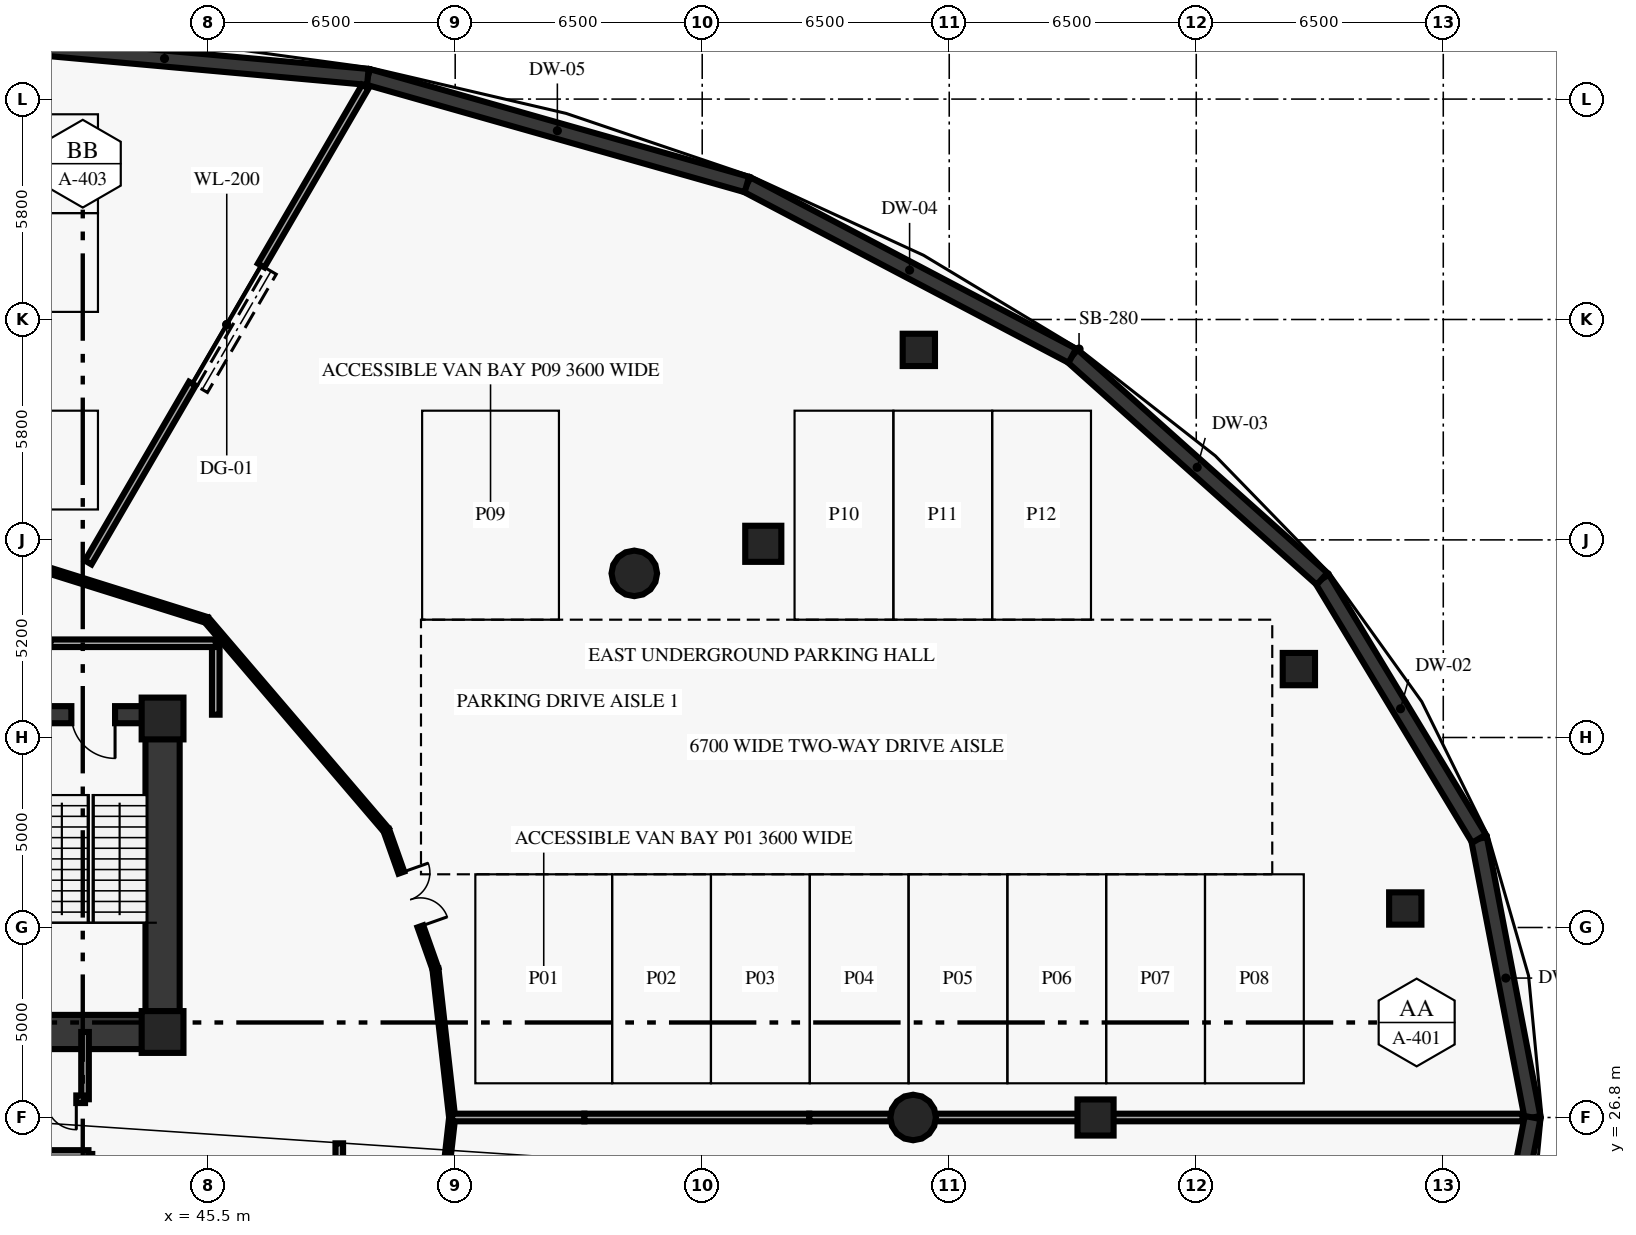
"""IFC4 building model, lengths in metres.
Left out: names, types, materials, properties, quantities, classifications, styles, units other than length and angle.
Written with IfcOpenShell. Run it as: python <this file> out.ifc"""

import sys

from ifc_helpers import new_model, si_unit, direction, frame, frame_2d, origin, origin_2d, place, context, subcontext, project, spatial, rectangle, circle, extrude, element, fill, save


model = new_model("IFC4")
c1 = context("Model", 3, precision=1e-05, world=origin(), true_north=direction((0.0, 1.0)))
c2 = subcontext(c1, "Body", "Model", "MODEL_VIEW")
j1 = project(units=[si_unit("LENGTHUNIT", "METRE"), si_unit("PLANEANGLEUNIT", "RADIAN")], contexts=[c1])
p1 = place(None, origin())
s1 = spatial("IfcSite", under=j1, at=p1, CompositionType="ELEMENT")
p2 = place(p1, origin())
s2 = spatial("IfcBuilding", under=s1, at=p2, CompositionType="ELEMENT")
p3 = place(p2, frame((0.0, 0.0, -9.0)))
s3 = spatial("IfcBuildingStorey", under=s2, at=p3, CompositionType="ELEMENT", Elevation=-9.0)
for number, where, z_axis, x_axis in (
    (1, (44.3, 29.05, 0.0), (0.0, 0.0, 1.0), (1.0, 0.0, 0.0)),
    (2, (44.3, 37.3, 0.0), (0.0, 0.0, 1.0), (1.0, 0.0, 0.0)),
):
    element("IfcColumn", number, at=place(p3, frame(where, z_axis=z_axis, x_axis=x_axis)), inside=s3, PredefinedType="PILASTER", context=c2, shape_type="SweptSolid", body=[
        extrude(rectangle(XDim=1.1, YDim=1.1, at=origin_2d()), origin(), (0.0, 0.0, 1.0), 4.2),
    ])
for number, where, z_axis, x_axis in (
    (3, (64.05, 26.8, 0.0), (0.0, 0.0, 1.0), (1.0, 0.0, 0.0)),
    (4, (56.713, 41.119, 0.0), (0.0, 0.0, 1.0), (1.0, 0.0, 0.0)),
):
    element("IfcColumn", number, at=place(p3, frame(where, z_axis=z_axis, x_axis=x_axis)), inside=s3, PredefinedType="COLUMN", context=c2, shape_type="SweptSolid", body=[
        extrude(circle(Radius=0.6, at=origin_2d()), origin(), (0.0, 0.0, 1.0), 4.2),
    ])
for number, where, z_axis, x_axis in (
    (5, (68.85, 26.8, 0.0), (0.0, 0.0, 1.0), (1.0, 0.0, 0.0)),
    (6, (60.107, 41.897, 0.0), (0.0, 0.0, 1.0), (1.0, 0.0, 0.0)),
):
    element("IfcColumn", number, at=place(p3, frame(where, z_axis=z_axis, x_axis=x_axis)), inside=s3, PredefinedType="COLUMN", context=c2, shape_type="SweptSolid", body=[
        extrude(rectangle(XDim=0.95, YDim=0.95, at=origin_2d()), origin(), (0.0, 0.0, 1.0), 4.2),
    ])
for number, where, z_axis, x_axis in (
    (7, (77.0, 32.3, 0.0), (0.0, 0.0, 1.0), (1.0, 0.0, 0.0)),
    (8, (74.2, 38.6, 0.0), (0.0, 0.0, 1.0), (1.0, 0.0, 0.0)),
    (9, (64.2, 47.0, 0.0), (0.0, 0.0, 1.0), (1.0, 0.0, 0.0)),
):
    element("IfcColumn", number, at=place(p3, frame(where, z_axis=z_axis, x_axis=x_axis)), inside=s3, PredefinedType="COLUMN", context=c2, shape_type="SweptSolid", body=[
        extrude(rectangle(XDim=0.85, YDim=0.85, at=origin_2d()), origin(), (0.0, 0.0, 1.0), 4.2),
    ])
p4 = place(p3, frame((44.3, 29.05, 0.0), z_axis=(0.0, 0.0, 1.0), x_axis=(0.0, 1.0, 0.0)))
e10 = element("IfcWall", 10, at=p4, inside=s3, PredefinedType="SHEAR", context=c2, shape_type="SweptSolid", body=[
    extrude(rectangle(XDim=8.35, YDim=0.9, at=frame_2d((4.175, 0.0))), origin(), (0.0, 0.0, 1.0), 4.2),
])
p5 = place(p3, frame((33.7, 29.05, 0.0), z_axis=(0.0, 0.0, 1.0), x_axis=(1.0, 0.0, 0.0)))
e11 = element("IfcWall", 11, at=p5, inside=s3, PredefinedType="SHEAR", context=c2, shape_type="SweptSolid", body=[
    extrude(rectangle(XDim=10.6, YDim=0.9, at=frame_2d((5.3, 0.0))), origin(), (0.0, 0.0, 1.0), 4.2),
])
p6 = place(p3, frame((80.35, 26.8, 0.0), z_axis=(0.0, 0.0, 1.0), x_axis=(-0.188595316219, 0.982054889861, 0.0)))
e12 = element("IfcWall", 12, at=p6, inside=s3, PredefinedType="SHEAR", context=c2, shape_type="SweptSolid", body=[
    extrude(rectangle(XDim=7.472, YDim=0.42, at=frame_2d((3.736, 0.0))), origin(), (0.0, 0.0, 1.0), 4.2),
])
p7 = place(p3, frame((78.941, 34.138, 0.0), z_axis=(0.0, 0.0, 1.0), x_axis=(-0.517122636798, 0.85591131463, 0.0)))
e13 = element("IfcWall", 13, at=p7, inside=s3, PredefinedType="SHEAR", context=c2, shape_type="SweptSolid", body=[
    extrude(rectangle(XDim=7.988, YDim=0.42, at=frame_2d((3.994, 0.0))), origin(), (0.0, 0.0, 1.0), 4.2),
])
p8 = place(p3, frame((74.81, 40.975, 0.0), z_axis=(0.0, 0.0, 1.0), x_axis=(-0.745720826992, 0.666258544554, 0.0)))
e14 = element("IfcWall", 14, at=p8, inside=s3, PredefinedType="SHEAR", context=c2, shape_type="SweptSolid", body=[
    extrude(rectangle(XDim=8.812, YDim=0.42, at=frame_2d((4.406, 0.0))), origin(), (0.0, 0.0, 1.0), 4.2),
])
p9 = place(p3, frame((68.239, 46.846, 0.0), z_axis=(0.0, 0.0, 1.0), x_axis=(-0.884971300821, 0.465645569852, 0.0)))
e15 = element("IfcWall", 15, at=p9, inside=s3, PredefinedType="SHEAR", context=c2, shape_type="SweptSolid", body=[
    extrude(rectangle(XDim=9.677, YDim=0.42, at=frame_2d((4.838, 0.0))), origin(), (0.0, 0.0, 1.0), 4.2),
])
p10 = place(p3, frame((59.675, 51.352, 0.0), z_axis=(0.0, 0.0, 1.0), x_axis=(-0.961967006375, 0.273165661541, 0.0)))
e16 = element("IfcWall", 16, at=p10, inside=s3, PredefinedType="SHEAR", context=c2, shape_type="SweptSolid", body=[
    extrude(rectangle(XDim=10.367, YDim=0.42, at=frame_2d((5.184, 0.0))), origin(), (0.0, 0.0, 1.0), 4.2),
])
p11 = place(p3, frame((49.702, 54.184, 0.0), z_axis=(0.0, 0.0, 1.0), x_axis=(-0.995952400538, 0.089882233296, 0.0)))
e17 = element("IfcWall", 17, at=p11, inside=s3, PredefinedType="SHEAR", context=c2, shape_type="SweptSolid", body=[
    extrude(rectangle(XDim=10.745, YDim=0.42, at=frame_2d((5.373, 0.0))), origin(), (0.0, 0.0, 1.0), 4.2),
])
p12 = place(p3, frame((78.941, 19.462, 0.0), z_axis=(0.0, 0.0, 1.0), x_axis=(0.188589264795, 0.982056051966, 0.0)))
e18 = element("IfcWall", 18, at=p12, inside=s3, PredefinedType="SHEAR", context=c2, shape_type="SweptSolid", body=[
    extrude(rectangle(XDim=7.472, YDim=0.42, at=frame_2d((3.736, 0.0))), origin(), (0.0, 0.0, 1.0), 4.2),
])
p13 = place(p3, frame((44.3, 37.4, 0.0), z_axis=(0.0, 0.0, 1.0), x_axis=(-1.0, 0.0, 0.0)))
e19 = element("IfcWall", 19, at=p13, inside=s3, PredefinedType="SHEAR", context=c2, shape_type="SweptSolid", body=[
    extrude(rectangle(XDim=3.65, YDim=0.45, at=frame_2d((1.825, 0.0))), origin(), (0.0, 0.0, 1.0), 4.2),
])
p14 = place(p13, frame((1.25, 0.0, 0.0)))
e20 = element("IfcOpeningElement", 20, at=p14, cuts=e19, PredefinedType="OPENING", context=c2, shape_type="SweptSolid", body=[
    extrude(rectangle(XDim=1.15, YDim=2.15, at=frame_2d((0.575, 1.075))), frame((0.0, 0.235, 0.0), z_axis=(0.0, -1.0, 0.0), x_axis=(1.0, 0.0, 0.0)), (0.0, 0.0, 1.0), 0.47),
])
p15 = place(p3, frame((45.7, 37.4, 0.0), z_axis=(0.0, 0.0, 1.0), x_axis=(0.0, 1.0, 0.0)))
e21 = element("IfcWall", 21, at=p15, inside=s3, PredefinedType="SOLIDWALL", context=c2, shape_type="SweptSolid", body=[
    extrude(rectangle(XDim=1.88, YDim=0.2, at=frame_2d((0.94, 0.0))), origin(), (0.0, 0.0, 1.0), 4.2),
])
p16 = place(p3, frame((45.7, 39.28, 0.0), z_axis=(0.0, 0.0, 1.0), x_axis=(-1.0, 0.0, 0.0)))
e22 = element("IfcWall", 22, at=p16, inside=s3, PredefinedType="SOLIDWALL", context=c2, shape_type="SweptSolid", body=[
    extrude(rectangle(XDim=6.6, YDim=0.2, at=frame_2d((3.3, 0.0))), origin(), (0.0, 0.0, 1.0), 4.2),
])
p17 = place(p16, frame((4.35, 0.0, 0.0)))
e23 = element("IfcOpeningElement", 23, at=p17, cuts=e22, PredefinedType="OPENING", context=c2, shape_type="SweptSolid", body=[
    extrude(rectangle(XDim=1.6, YDim=2.2, at=frame_2d((0.8, 1.1))), frame((0.0, 0.11, 0.0), z_axis=(0.0, -1.0, 0.0), x_axis=(1.0, 0.0, 0.0)), (0.0, 0.0, 1.0), 0.22),
])
p18 = place(p3, frame((42.26, 27.28, 0.0), z_axis=(0.0, 0.0, 1.0), x_axis=(0.0, 1.0, 0.0)))
e24 = element("IfcWall", 24, at=p18, inside=s3, PredefinedType="SOLIDWALL", context=c2, shape_type="SweptSolid", body=[
    extrude(rectangle(XDim=1.77, YDim=0.2, at=frame_2d((0.885, 0.0))), origin(), (0.0, 0.0, 1.0), 4.2),
])
p19 = place(p3, frame((41.0, 27.28, 0.0), z_axis=(0.0, 0.0, 1.0), x_axis=(1.0, 0.0, 0.0)))
e25 = element("IfcWall", 25, at=p19, inside=s3, PredefinedType="SOLIDWALL", context=c2, shape_type="SweptSolid", body=[
    extrude(rectangle(XDim=1.26, YDim=0.2, at=frame_2d((0.63, 0.0))), origin(), (0.0, 0.0, 1.0), 4.2),
])
p20 = place(p19, frame((0.23, 0.0, 0.0)))
e26 = element("IfcOpeningElement", 26, at=p20, cuts=e25, PredefinedType="OPENING", context=c2, shape_type="SweptSolid", body=[
    extrude(rectangle(XDim=0.8, YDim=2.05, at=frame_2d((0.4, 1.025))), frame((0.0, 0.11, 0.0), z_axis=(0.0, -1.0, 0.0), x_axis=(1.0, 0.0, 0.0)), (0.0, 0.0, 1.0), 0.22),
])
p21 = place(p3, frame((48.95, 19.05, 0.0), z_axis=(0.0, 0.0, 1.0), x_axis=(0.0, 1.0, 0.0)))
e27 = element("IfcWall", 27, at=p21, inside=s3, PredefinedType="SOLIDWALL", context=c2, shape_type="SweptSolid", body=[
    extrude(rectangle(XDim=7.07, YDim=0.2, at=frame_2d((3.535, 0.0))), origin(), (0.0, 0.0, 1.0), 4.2),
])
p22 = place(p21, frame((2.785, 0.0, 0.0)))
e28 = element("IfcOpeningElement", 28, at=p22, cuts=e27, PredefinedType="OPENING", context=c2, shape_type="SweptSolid", body=[
    extrude(rectangle(XDim=1.5, YDim=2.2, at=frame_2d((0.75, 1.1))), frame((0.0, 0.11, 0.0), z_axis=(0.0, -1.0, 0.0), x_axis=(1.0, 0.0, 0.0)), (0.0, 0.0, 1.0), 0.22),
])
p23 = place(p3, frame((42.35, 21.35, 0.0), z_axis=(0.0, 0.0, 1.0), x_axis=(0.0, 1.0, 0.0)))
e29 = element("IfcWall", 29, at=p23, inside=s3, PredefinedType="SOLIDWALL", context=c2, shape_type="SweptSolid", body=[
    extrude(rectangle(XDim=4.49, YDim=0.2, at=frame_2d((2.245, 0.0))), origin(), (0.0, 0.0, 1.0), 4.2),
])
p24 = place(p3, frame((42.35, 25.84, 0.0), z_axis=(0.0, 0.0, 1.0), x_axis=(-1.0, 0.0, 0.0)))
e30 = element("IfcWall", 30, at=p24, inside=s3, PredefinedType="SOLIDWALL", context=c2, shape_type="SweptSolid", body=[
    extrude(rectangle(XDim=8.65, YDim=0.2, at=frame_2d((4.325, 0.0))), origin(), (0.0, 0.0, 1.0), 4.2),
])
p25 = place(p24, frame((3.575, 0.0, 0.0)))
e31 = element("IfcOpeningElement", 31, at=p25, cuts=e30, PredefinedType="OPENING", context=c2, shape_type="SweptSolid", body=[
    extrude(rectangle(XDim=1.5, YDim=2.2, at=frame_2d((0.75, 1.1))), frame((0.0, 0.11, 0.0), z_axis=(0.0, -1.0, 0.0), x_axis=(1.0, 0.0, 0.0)), (0.0, 0.0, 1.0), 0.22),
])
p26 = place(p3, frame((51.92, 26.8, 0.0), z_axis=(0.0, 0.0, 1.0), x_axis=(-0.111731247657, 0.993738460711, 0.0)))
e32 = element("IfcWall", 32, at=p26, inside=s3, PredefinedType="PARTITIONING", context=c2, shape_type="SweptSolid", body=[
    extrude(rectangle(XDim=3.938, YDim=0.16, at=frame_2d((1.969, 0.0))), origin(), (0.0, 0.0, 1.0), 4.2),
])
p27 = place(p3, frame((50.189, 34.36, 0.0), z_axis=(0.0, 0.0, 1.0), x_axis=(0.333684770033, -0.942684716248, 0.0)))
e33 = element("IfcWall", 33, at=p27, inside=s3, PredefinedType="PARTITIONING", context=c2, shape_type="SweptSolid", body=[
    extrude(rectangle(XDim=3.869, YDim=0.16, at=frame_2d((1.935, 0.0))), origin(), (0.0, 0.0, 1.0), 4.2),
])
p28 = place(p27, frame((1.184, 0.0, 0.0)))
e34 = element("IfcOpeningElement", 34, at=p28, cuts=e33, PredefinedType="OPENING", context=c2, shape_type="SweptSolid", body=[
    extrude(rectangle(XDim=1.5, YDim=2.2, at=frame_2d((0.75, 1.1))), frame((0.0, 0.09, 0.0), z_axis=(0.0, -1.0, 0.0), x_axis=(1.0, 0.0, 0.0)), (0.0, 0.0, 1.0), 0.18),
])
p29 = place(p3, frame((50.189, 34.36, 0.0), z_axis=(0.0, 0.0, 1.0), x_axis=(-0.649652680018, 0.760231145998, 0.0)))
e35 = element("IfcWall", 35, at=p29, inside=s3, PredefinedType="PARTITIONING", context=c2, shape_type="SweptSolid", body=[
    extrude(rectangle(XDim=7.279, YDim=0.16, at=frame_2d((3.64, 0.0))), origin(), (0.0, 0.0, 1.0), 4.2),
])
p30 = place(p3, frame((45.46, 39.894, 0.0), z_axis=(0.0, 0.0, 1.0), x_axis=(-0.95417919824, 0.29923578938, 0.0)))
e36 = element("IfcWall", 36, at=p30, inside=s3, PredefinedType="PARTITIONING", context=c2, shape_type="SweptSolid", body=[
    extrude(rectangle(XDim=6.77, YDim=0.16, at=frame_2d((3.385, 0.0))), origin(), (0.0, 0.0, 1.0), 4.2),
])
p31 = place(p3, frame((51.92, 26.8, 0.0), z_axis=(0.0, 0.0, 1.0), x_axis=(-0.111724363671, -0.99373923469, 0.0)))
e37 = element("IfcWall", 37, at=p31, inside=s3, PredefinedType="PARTITIONING", context=c2, shape_type="SweptSolid", body=[
    extrude(rectangle(XDim=3.938, YDim=0.16, at=frame_2d((1.969, 0.0))), origin(), (0.0, 0.0, 1.0), 4.2),
])
p32 = place(p31, frame((1.219, 0.0, 0.0)))
e38 = element("IfcOpeningElement", 38, at=p32, cuts=e37, PredefinedType="OPENING", context=c2, shape_type="SweptSolid", body=[
    extrude(rectangle(XDim=1.5, YDim=2.2, at=frame_2d((0.75, 1.1))), frame((0.0, 0.09, 0.0), z_axis=(0.0, -1.0, 0.0), x_axis=(1.0, 0.0, 0.0)), (0.0, 0.0, 1.0), 0.18),
])
p33 = place(p3, frame((51.92, 26.8, 0.0), z_axis=(0.0, 0.0, 1.0), x_axis=(1.0, 0.0, 0.0)))
e39 = element("IfcWall", 39, at=p33, inside=s3, PredefinedType="SOLIDWALL", context=c2, shape_type="SweptSolid", body=[
    extrude(rectangle(XDim=3.48, YDim=0.2, at=frame_2d((1.74, 0.0))), origin(), (0.0, 0.0, 1.0), 4.2),
])
p34 = place(p3, frame((55.4, 26.8, 0.0), z_axis=(0.0, 0.0, 1.0), x_axis=(1.0, 0.0, 0.0)))
e40 = element("IfcWall", 40, at=p34, inside=s3, PredefinedType="SOLIDWALL", context=c2, shape_type="SweptSolid", body=[
    extrude(rectangle(XDim=5.917, YDim=0.2, at=frame_2d((2.958, 0.0))), origin(), (0.0, 0.0, 1.0), 4.2),
])
p35 = place(p3, frame((61.317, 26.8, 0.0), z_axis=(0.0, 0.0, 1.0), x_axis=(1.0, 0.0, 0.0)))
e41 = element("IfcWall", 41, at=p35, inside=s3, PredefinedType="SOLIDWALL", context=c2, shape_type="SweptSolid", body=[
    extrude(rectangle(XDim=7.533, YDim=0.2, at=frame_2d((3.767, 0.0))), origin(), (0.0, 0.0, 1.0), 3.16),
])
p36 = place(p3, frame((68.85, 26.8, 0.0), z_axis=(0.0, 0.0, 1.0), x_axis=(1.0, 0.0, 0.0)))
e42 = element("IfcWall", 42, at=p36, inside=s3, PredefinedType="SOLIDWALL", context=c2, shape_type="SweptSolid", body=[
    extrude(rectangle(XDim=11.235, YDim=0.2, at=frame_2d((5.617, 0.0))), origin(), (0.0, 0.0, 1.0), 4.2),
])
p37 = place(p3, frame((42.344, 41.405, 0.0), z_axis=(0.0, 0.0, 1.0), x_axis=(0.503097710949, 0.864229537355, 0.0)))
e43 = element("IfcWall", 43, at=p37, inside=s3, PredefinedType="SOLIDWALL", context=c2, shape_type="SweptSolid", body=[
    extrude(rectangle(XDim=14.49, YDim=0.2, at=frame_2d((7.245, 0.0))), origin(), (0.0, 0.0, 1.0), 4.2),
])
p38 = place(p37, frame((5.445, 0.0, 0.0)))
e44 = element("IfcOpeningElement", 44, at=p38, cuts=e43, PredefinedType="OPENING", context=c2, shape_type="SweptSolid", body=[
    extrude(rectangle(XDim=3.6, YDim=2.4, at=frame_2d((1.8, 1.2))), frame((0.0, 0.11, 0.0), z_axis=(0.0, -1.0, 0.0), x_axis=(1.0, 0.0, 0.0)), (0.0, 0.0, 1.0), 0.22),
])
p39 = place(p14, origin())
e45 = element("IfcDoor", 45, at=p39, inside=s3, OperationType="SINGLE_SWING_LEFT", PredefinedType="DOOR", context=c2, shape_type="SweptSolid", body=[
    extrude(rectangle(XDim=1.15, YDim=2.15, at=frame_2d((0.575, 1.075))), frame((0.0, 0.025, 0.0), z_axis=(0.0, -1.0, 0.0), x_axis=(1.0, 0.0, 0.0)), (0.0, 0.0, 1.0), 0.05),
])
fill(e20, e45)
p40 = place(p20, origin())
e46 = element("IfcDoor", 46, at=p40, inside=s3, OperationType="SINGLE_SWING_RIGHT", PredefinedType="DOOR", context=c2, shape_type="SweptSolid", body=[
    extrude(rectangle(XDim=0.8, YDim=2.05, at=frame_2d((0.4, 1.025))), frame((0.0, 0.025, 0.0), z_axis=(0.0, -1.0, 0.0), x_axis=(1.0, 0.0, 0.0)), (0.0, 0.0, 1.0), 0.05),
])
fill(e26, e46)
p41 = place(p28, origin())
e47 = element("IfcDoor", 47, at=p41, inside=s3, OperationType="DOUBLE_DOOR_SINGLE_SWING", PredefinedType="DOOR", context=c2, shape_type="SweptSolid", body=[
    extrude(rectangle(XDim=1.5, YDim=2.2, at=frame_2d((0.75, 1.1))), frame((0.0, 0.025, 0.0), z_axis=(0.0, -1.0, 0.0), x_axis=(1.0, 0.0, 0.0)), (0.0, 0.0, 1.0), 0.05),
])
fill(e34, e47)
p42 = place(p38, origin())
e48 = element("IfcDoor", 48, at=p42, inside=s3, OperationType="ROLLINGUP", PredefinedType="GATE", context=c2, shape_type="SweptSolid", body=[
    extrude(rectangle(XDim=3.6, YDim=2.4, at=frame_2d((1.8, 1.2))), frame((0.0, 0.025, 0.0), z_axis=(0.0, -1.0, 0.0), x_axis=(1.0, 0.0, 0.0)), (0.0, 0.0, 1.0), 0.05),
])
fill(e44, e48)
save(model, sys.argv[1])
